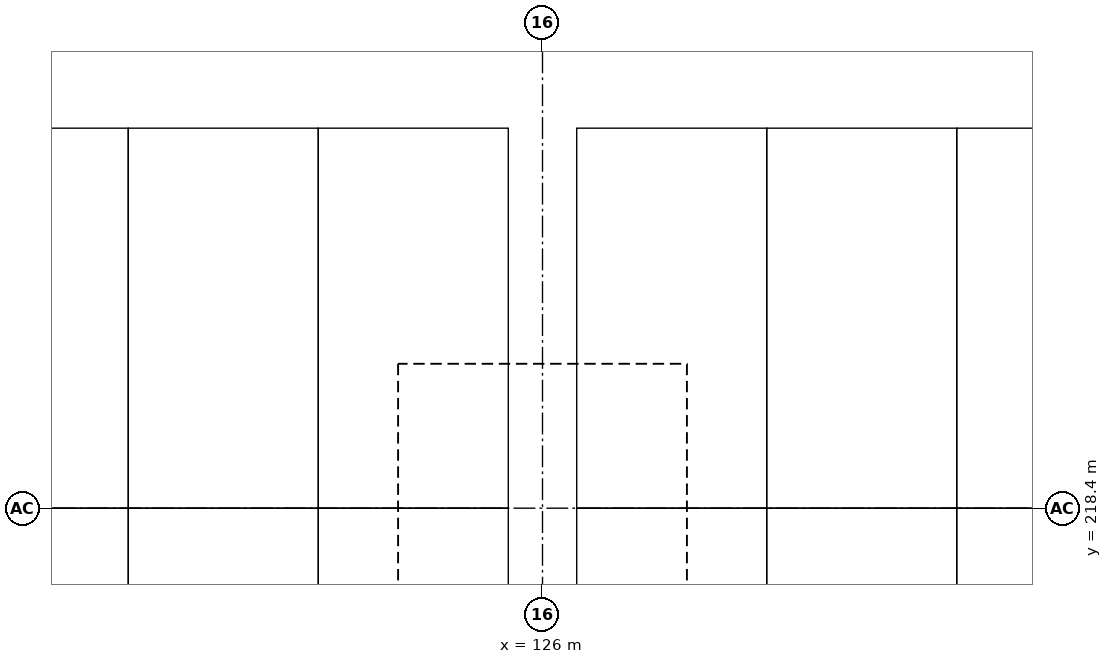
"""IFC4 building model, lengths in metres.
Left out: names, types, materials, properties, quantities, classifications, styles, units other than length and angle.
Written with IfcOpenShell. Run it as: python <this file> out.ifc"""

import sys

from ifc_helpers import new_model, si_unit, direction, frame, origin, origin_2d, place, context, subcontext, project, spatial, rectangle, extrude, element, save


model = new_model("IFC4")
c1 = context("Model", 3, precision=1e-05, world=origin(), true_north=direction((0.0, 1.0)))
c2 = subcontext(c1, "Body", "Model", "MODEL_VIEW")
j1 = project(units=[si_unit("LENGTHUNIT", "METRE"), si_unit("PLANEANGLEUNIT", "RADIAN")], contexts=[c1])
p1 = place(None, origin())
s1 = spatial("IfcSite", under=j1, at=p1, CompositionType="ELEMENT")
p2 = place(p1, origin())
s2 = spatial("IfcBuilding", under=s1, at=p2, CompositionType="ELEMENT")
p3 = place(p2, frame((0.0, 0.0, -3.0)))
s3 = spatial("IfcBuildingStorey", under=s2, at=p3, CompositionType="ELEMENT", Elevation=-3.0)
p4 = place(p3, frame((126.0, 218.4, 0.0), z_axis=(0.0, 0.0, 1.0), x_axis=(1.0, 0.0, 0.0)))
e1 = element("IfcColumn", 1, at=p4, inside=s3, PredefinedType="COLUMN", context=c2, shape_type="SweptSolid", body=[
    extrude(rectangle(XDim=0.8, YDim=0.8, at=origin_2d()), origin(), (0.0, 0.0, 1.0), 2.4),
])
save(model, sys.argv[1])
